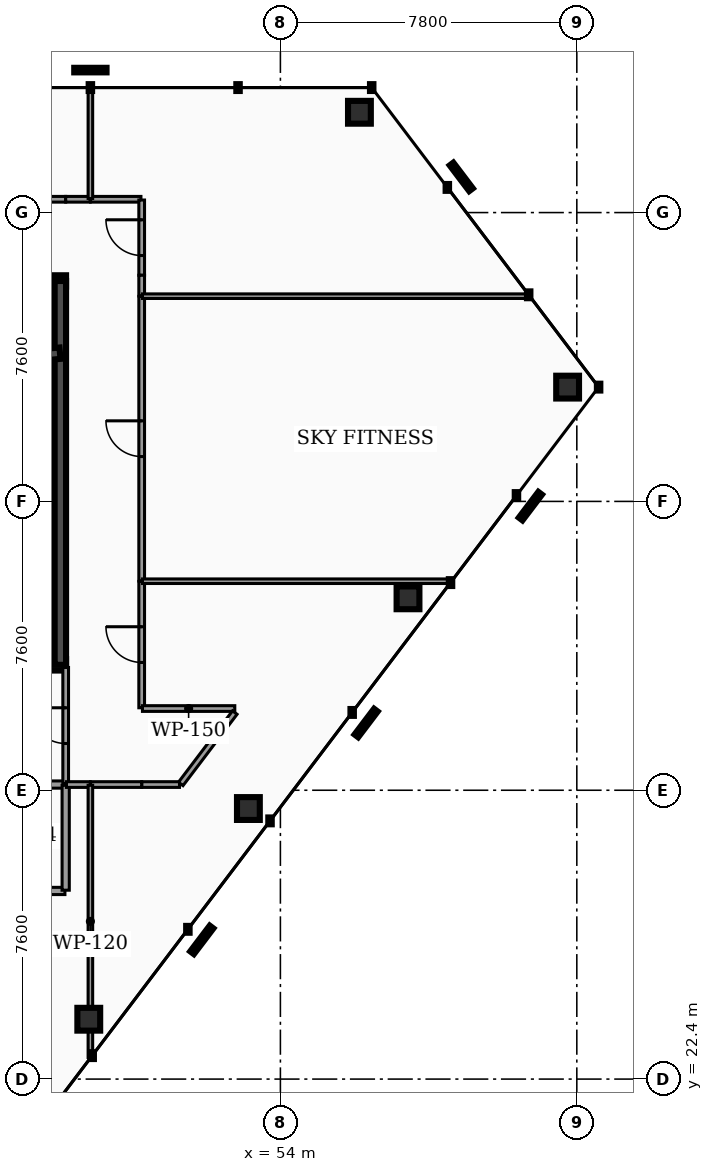
"""IFC4 building model, lengths in metres.
Left out: names, types, materials, properties, quantities, classifications, styles, units other than length and angle.
Written with IfcOpenShell. Run it as: python <this file> out.ifc"""

import sys

from ifc_helpers import new_model, si_unit, direction, frame, frame_2d, origin, origin_2d, place, context, subcontext, project, spatial, rectangle, hollow_rectangle, extrude, element, fill, save


model = new_model("IFC4")
c1 = context("Model", 3, precision=1e-05, world=origin(), true_north=direction((0.0, 1.0)))
c2 = subcontext(c1, "Body", "Model", "MODEL_VIEW")
j1 = project(units=[si_unit("LENGTHUNIT", "METRE"), si_unit("PLANEANGLEUNIT", "RADIAN")], contexts=[c1])
p1 = place(None, origin())
s1 = spatial("IfcSite", under=j1, at=p1, CompositionType="ELEMENT")
p2 = place(p1, origin())
s2 = spatial("IfcBuilding", under=s1, at=p2, CompositionType="ELEMENT")
p3 = place(p2, frame((0.0, 0.0, 199.92)))
s3 = spatial("IfcBuildingStorey", under=s2, at=p3, CompositionType="ELEMENT", Elevation=199.92)
p4 = place(p3, frame((28.5, 43.4, 0.0), z_axis=(0.0, 0.0, 1.0), x_axis=(1.0, 0.0, 0.0)))
e1 = element("IfcWall", 1, at=p4, inside=s3, PredefinedType="SHEAR", context=c2, shape_type="SweptSolid", body=[
    extrude(rectangle(XDim=19.86, YDim=0.3, at=frame_2d((9.93, 0.0))), origin(), (0.0, 0.0, 1.0), 4.12),
])
p5 = place(p3, frame((28.5, 33.3, 0.0), z_axis=(0.0, 0.0, 1.0), x_axis=(1.0, 0.0, 0.0)))
e2 = element("IfcWall", 2, at=p5, inside=s3, PredefinedType="SHEAR", context=c2, shape_type="SweptSolid", body=[
    extrude(rectangle(XDim=19.86, YDim=0.3, at=frame_2d((9.93, 0.0))), origin(), (0.0, 0.0, 1.0), 4.12),
])
p6 = place(p5, frame((3.93, 0.0, 0.0)))
e3 = element("IfcOpeningElement", 3, at=p6, cuts=e2, PredefinedType="OPENING", context=c2, shape_type="SweptSolid", body=[
    extrude(rectangle(XDim=1.1, YDim=2.15, at=frame_2d((0.55, 1.075))), frame((0.0, 0.16, 0.0), z_axis=(0.0, -1.0, 0.0), x_axis=(1.0, 0.0, 0.0)), (0.0, 0.0, 1.0), 0.32),
])
p7 = place(p5, frame((14.77, 0.0, 0.0)))
e4 = element("IfcOpeningElement", 4, at=p7, cuts=e2, PredefinedType="OPENING", context=c2, shape_type="SweptSolid", body=[
    extrude(rectangle(XDim=1.1, YDim=2.15, at=frame_2d((0.55, 1.075))), frame((0.0, 0.16, 0.0), z_axis=(0.0, -1.0, 0.0), x_axis=(1.0, 0.0, 0.0)), (0.0, 0.0, 1.0), 0.32),
])
p8 = place(p5, frame((11.25, 0.0, 0.0)))
e5 = element("IfcOpeningElement", 5, at=p8, cuts=e2, PredefinedType="OPENING", context=c2, shape_type="SweptSolid", body=[
    extrude(rectangle(XDim=1.0, YDim=2.1, at=frame_2d((0.5, 1.05))), frame((0.0, 0.16, 0.0), z_axis=(0.0, -1.0, 0.0), x_axis=(1.0, 0.0, 0.0)), (0.0, 0.0, 1.0), 0.32),
])
p9 = place(p5, frame((12.95, 0.0, 0.0)))
e6 = element("IfcOpeningElement", 6, at=p9, cuts=e2, PredefinedType="OPENING", context=c2, shape_type="SweptSolid", body=[
    extrude(rectangle(XDim=1.0, YDim=2.1, at=frame_2d((0.5, 1.05))), frame((0.0, 0.16, 0.0), z_axis=(0.0, -1.0, 0.0), x_axis=(1.0, 0.0, 0.0)), (0.0, 0.0, 1.0), 0.32),
])
p10 = place(p5, frame((5.85, 0.0, 0.0)))
e7 = element("IfcOpeningElement", 7, at=p10, cuts=e2, PredefinedType="OPENING", context=c2, shape_type="SweptSolid", body=[
    extrude(rectangle(XDim=1.0, YDim=2.1, at=frame_2d((0.5, 1.05))), frame((0.0, 0.16, 0.0), z_axis=(0.0, -1.0, 0.0), x_axis=(1.0, 0.0, 0.0)), (0.0, 0.0, 1.0), 0.32),
])
p11 = place(p5, frame((1.21, 0.0, 0.0)))
e8 = element("IfcOpeningElement", 8, at=p11, cuts=e2, PredefinedType="OPENING", context=c2, shape_type="SweptSolid", body=[
    extrude(rectangle(XDim=1.1, YDim=2.2, at=frame_2d((0.55, 1.1))), frame((0.0, 0.16, 0.0), z_axis=(0.0, -1.0, 0.0), x_axis=(1.0, 0.0, 0.0)), (0.0, 0.0, 1.0), 0.32),
])
p12 = place(p5, frame((9.34, 0.0, 0.0)))
e9 = element("IfcOpeningElement", 9, at=p12, cuts=e2, PredefinedType="OPENING", context=c2, shape_type="SweptSolid", body=[
    extrude(rectangle(XDim=1.12, YDim=2.05, at=frame_2d((0.56, 1.025))), frame((0.0, 0.16, 0.0), z_axis=(0.0, -1.0, 0.0), x_axis=(1.0, 0.0, 0.0)), (0.0, 0.0, 1.0), 0.32),
])
p13 = place(p5, frame((17.55, 0.0, 0.0)))
e10 = element("IfcOpeningElement", 10, at=p13, cuts=e2, PredefinedType="OPENING", context=c2, shape_type="SweptSolid", body=[
    extrude(rectangle(XDim=1.1, YDim=2.2, at=frame_2d((0.55, 1.1))), frame((0.0, 0.16, 0.0), z_axis=(0.0, -1.0, 0.0), x_axis=(1.0, 0.0, 0.0)), (0.0, 0.0, 1.0), 0.32),
])
p14 = place(p3, frame((48.21, 33.3, 0.0), z_axis=(0.0, 0.0, 1.0), x_axis=(0.0, 1.0, 0.0)))
e11 = element("IfcWall", 11, at=p14, inside=s3, PredefinedType="SHEAR", context=c2, shape_type="SweptSolid", body=[
    extrude(rectangle(XDim=10.1, YDim=0.3, at=frame_2d((5.05, 0.0))), origin(), (0.0, 0.0, 1.0), 4.12),
])
p15 = place(p3, frame((44.98, 41.2, 0.0), z_axis=(0.0, 0.0, 1.0), x_axis=(0.995686468965, 0.09278176286, 0.0)))
e12 = element("IfcWall", 12, at=p15, inside=s3, PredefinedType="SHEAR", context=c2, shape_type="SweptSolid", body=[
    extrude(rectangle(XDim=3.234, YDim=0.3, at=frame_2d((1.617, 0.0))), origin(), (0.0, 0.0, 1.0), 4.12),
])
for number, where, z_axis, x_axis in (
    (13, (56.08, 47.839, 0.0), (0.0, 0.0, 1.0), (1.0, 0.0, 0.0)),
    (14, (48.958, 23.975, 0.0), (0.0, 0.0, 1.0), (1.0, 0.0, 0.0)),
    (15, (53.158, 29.519, 0.0), (0.0, 0.0, 1.0), (1.0, 0.0, 0.0)),
    (16, (57.358, 35.063, 0.0), (0.0, 0.0, 1.0), (1.0, 0.0, 0.0)),
    (17, (61.558, 40.607, 0.0), (0.0, 0.0, 1.0), (1.0, 0.0, 0.0)),
):
    element("IfcColumn", number, at=place(p3, frame(where, z_axis=z_axis, x_axis=x_axis)), inside=s3, PredefinedType="COLUMN", context=c2, shape_type="SweptSolid", body=[
        extrude(hollow_rectangle(XDim=0.6, YDim=0.6, WallThickness=0.03, at=origin_2d()), origin(), (0.0, 0.0, 1.0), 4.12),
    ])
p16 = place(p3, frame((45.405, 30.15, 0.0), z_axis=(0.0, 0.0, 1.0), x_axis=(1.0, 0.0, 0.0)))
e18 = element("IfcWall", 18, at=p16, inside=s3, PredefinedType="PARTITIONING", context=c2, shape_type="SweptSolid", body=[
    extrude(rectangle(XDim=2.925, YDim=0.19, at=frame_2d((1.462, 0.0))), origin(), (0.0, 0.0, 1.0), 3.077),
])
p17 = place(p16, frame((0.903, 0.0, 0.0)))
e19 = element("IfcOpeningElement", 19, at=p17, cuts=e18, PredefinedType="OPENING", context=c2, shape_type="SweptSolid", body=[
    extrude(rectangle(XDim=1.12, YDim=2.05, at=frame_2d((0.56, 1.025))), frame((0.0, 0.105, 0.0), z_axis=(0.0, -1.0, 0.0), x_axis=(1.0, 0.0, 0.0)), (0.0, 0.0, 1.0), 0.21),
])
p18 = place(p3, frame((48.35, 30.17, 0.0), z_axis=(0.0, 0.0, 1.0), x_axis=(0.0, 1.0, 0.0)))
e20 = element("IfcWall", 20, at=p18, inside=s3, PredefinedType="PARTITIONING", context=c2, shape_type="SweptSolid", body=[
    extrude(rectangle(XDim=3.06, YDim=0.15, at=frame_2d((1.53, 0.0))), origin(), (0.0, 0.0, 1.0), 3.077),
])
p19 = place(p18, frame((1.06, 0.0, 0.0)))
e21 = element("IfcOpeningElement", 21, at=p19, cuts=e20, PredefinedType="OPENING", context=c2, shape_type="SweptSolid", body=[
    extrude(rectangle(XDim=0.94, YDim=2.05, at=frame_2d((0.47, 1.025))), frame((0.0, 0.085, 0.0), z_axis=(0.0, -1.0, 0.0), x_axis=(1.0, 0.0, 0.0)), (0.0, 0.0, 1.0), 0.17),
])
p20 = place(p3, frame((45.42, 27.35, 0.0), z_axis=(0.0, 0.0, 1.0), x_axis=(1.0, 0.0, 0.0)))
e22 = element("IfcWall", 22, at=p20, inside=s3, PredefinedType="PARTITIONING", context=c2, shape_type="SweptSolid", body=[
    extrude(rectangle(XDim=2.91, YDim=0.19, at=frame_2d((1.455, 0.0))), origin(), (0.0, 0.0, 1.0), 3.077),
])
p21 = place(p3, frame((48.35, 27.37, 0.0), z_axis=(0.0, 0.0, 1.0), x_axis=(0.0, 1.0, 0.0)))
e23 = element("IfcWall", 23, at=p21, inside=s3, PredefinedType="PARTITIONING", context=c2, shape_type="SweptSolid", body=[
    extrude(rectangle(XDim=2.76, YDim=0.19, at=frame_2d((1.38, 0.0))), origin(), (0.0, 0.0, 1.0), 3.077),
])
p22 = place(p3, frame((48.37, 30.15, 0.0), z_axis=(0.0, 0.0, 1.0), x_axis=(1.0, 0.0, 0.0)))
e24 = element("IfcWall", 24, at=p22, inside=s3, PredefinedType="PARTITIONING", context=c2, shape_type="SweptSolid", body=[
    extrude(rectangle(XDim=0.625, YDim=0.15, at=frame_2d((0.312, 0.0))), origin(), (0.0, 0.0, 1.0), 3.077),
])
p23 = place(p3, frame((50.35, 32.17, 0.0), z_axis=(0.0, 0.0, 1.0), x_axis=(0.0, 1.0, 0.0)))
e25 = element("IfcWall", 25, at=p23, inside=s3, PredefinedType="PARTITIONING", context=c2, shape_type="SweptSolid", body=[
    extrude(rectangle(XDim=3.325, YDim=0.15, at=frame_2d((1.663, 0.0))), origin(), (0.0, 0.0, 1.0), 3.077),
])
p24 = place(p23, frame((1.192, 0.0, 0.0)))
e26 = element("IfcOpeningElement", 26, at=p24, cuts=e25, PredefinedType="OPENING", context=c2, shape_type="SweptSolid", body=[
    extrude(rectangle(XDim=0.94, YDim=2.05, at=frame_2d((0.47, 1.025))), frame((0.0, 0.085, 0.0), z_axis=(0.0, -1.0, 0.0), x_axis=(1.0, 0.0, 0.0)), (0.0, 0.0, 1.0), 0.17),
])
p25 = place(p3, frame((50.37, 32.15, 0.0), z_axis=(0.0, 0.0, 1.0), x_axis=(1.0, 0.0, 0.0)))
e27 = element("IfcWall", 27, at=p25, inside=s3, PredefinedType="PARTITIONING", context=c2, shape_type="SweptSolid", body=[
    extrude(rectangle(XDim=2.43, YDim=0.15, at=frame_2d((1.215, 0.0))), origin(), (0.0, 0.0, 1.0), 3.077),
])
p26 = place(p3, frame((51.377, 30.166, 0.0), z_axis=(0.0, 0.0, 1.0), x_axis=(0.603855693114, 0.797093659424, 0.0)))
e28 = element("IfcWall", 28, at=p26, inside=s3, PredefinedType="PARTITIONING", context=c2, shape_type="SweptSolid", body=[
    extrude(rectangle(XDim=2.356, YDim=0.15, at=frame_2d((1.178, 0.0))), origin(), (0.0, 0.0, 1.0), 3.077),
])
p27 = place(p3, frame((50.35, 30.15, 0.0), z_axis=(0.0, 0.0, 1.0), x_axis=(1.0, 0.0, 0.0)))
e29 = element("IfcWall", 29, at=p27, inside=s3, PredefinedType="PARTITIONING", context=c2, shape_type="SweptSolid", body=[
    extrude(rectangle(XDim=0.995, YDim=0.15, at=frame_2d((0.498, 0.0))), origin(), (0.0, 0.0, 1.0), 3.077),
])
p28 = place(p3, frame((49.005, 30.15, 0.0), z_axis=(0.0, 0.0, 1.0), x_axis=(1.0, 0.0, 0.0)))
e30 = element("IfcWall", 30, at=p28, inside=s3, PredefinedType="PARTITIONING", context=c2, shape_type="SweptSolid", body=[
    extrude(rectangle(XDim=1.345, YDim=0.15, at=frame_2d((0.673, 0.0))), origin(), (0.0, 0.0, 1.0), 3.077),
])
p29 = place(p3, frame((50.35, 35.505, 0.0), z_axis=(0.0, 0.0, 1.0), x_axis=(0.0, 1.0, 0.0)))
e31 = element("IfcWall", 31, at=p29, inside=s3, PredefinedType="PARTITIONING", context=c2, shape_type="SweptSolid", body=[
    extrude(rectangle(XDim=7.49, YDim=0.15, at=frame_2d((3.745, 0.0))), origin(), (0.0, 0.0, 1.0), 3.077),
])
p30 = place(p29, frame((3.275, 0.0, 0.0)))
e32 = element("IfcOpeningElement", 32, at=p30, cuts=e31, PredefinedType="OPENING", context=c2, shape_type="SweptSolid", body=[
    extrude(rectangle(XDim=0.94, YDim=2.05, at=frame_2d((0.47, 1.025))), frame((0.0, 0.085, 0.0), z_axis=(0.0, -1.0, 0.0), x_axis=(1.0, 0.0, 0.0)), (0.0, 0.0, 1.0), 0.17),
])
p31 = place(p3, frame((49.005, 45.55, 0.0), z_axis=(0.0, 0.0, 1.0), x_axis=(1.0, 0.0, 0.0)))
e33 = element("IfcWall", 33, at=p31, inside=s3, PredefinedType="PARTITIONING", context=c2, shape_type="SweptSolid", body=[
    extrude(rectangle(XDim=1.325, YDim=0.15, at=frame_2d((0.663, 0.0))), origin(), (0.0, 0.0, 1.0), 3.077),
])
p32 = place(p3, frame((50.35, 43.55, 0.0), z_axis=(0.0, 0.0, 1.0), x_axis=(0.0, 1.0, 0.0)))
e34 = element("IfcWall", 34, at=p32, inside=s3, PredefinedType="PARTITIONING", context=c2, shape_type="SweptSolid", body=[
    extrude(rectangle(XDim=1.98, YDim=0.15, at=frame_2d((0.99, 0.0))), origin(), (0.0, 0.0, 1.0), 3.077),
])
p33 = place(p32, frame((0.52, 0.0, 0.0)))
e35 = element("IfcOpeningElement", 35, at=p33, cuts=e34, PredefinedType="OPENING", context=c2, shape_type="SweptSolid", body=[
    extrude(rectangle(XDim=0.94, YDim=2.05, at=frame_2d((0.47, 1.025))), frame((0.0, 0.085, 0.0), z_axis=(0.0, -1.0, 0.0), x_axis=(1.0, 0.0, 0.0)), (0.0, 0.0, 1.0), 0.17),
])
p34 = place(p3, frame((50.35, 43.005, 0.0), z_axis=(0.0, 0.0, 1.0), x_axis=(0.0, 1.0, 0.0)))
e36 = element("IfcWall", 36, at=p34, inside=s3, PredefinedType="PARTITIONING", context=c2, shape_type="SweptSolid", body=[
    extrude(rectangle(XDim=0.545, YDim=0.15, at=frame_2d((0.272, 0.0))), origin(), (0.0, 0.0, 1.0), 3.077),
])
p35 = place(p3, frame((28.55, 45.55, 0.0), z_axis=(0.0, 0.0, 1.0), x_axis=(1.0, 0.0, 0.0)))
e37 = element("IfcWall", 37, at=p35, inside=s3, PredefinedType="PARTITIONING", context=c2, shape_type="SweptSolid", body=[
    extrude(rectangle(XDim=19.8, YDim=0.15, at=frame_2d((9.9, 0.0))), origin(), (0.0, 0.0, 1.0), 3.077),
])
p36 = place(p35, frame((9.34, 0.0, 0.0)))
e38 = element("IfcOpeningElement", 38, at=p36, cuts=e37, PredefinedType="OPENING", context=c2, shape_type="SweptSolid", body=[
    extrude(rectangle(XDim=1.12, YDim=2.05, at=frame_2d((0.56, 1.025))), frame((0.0, 0.085, 0.0), z_axis=(0.0, -1.0, 0.0), x_axis=(1.0, 0.0, 0.0)), (0.0, 0.0, 1.0), 0.17),
])
p37 = place(p3, frame((48.35, 45.55, 0.0), z_axis=(0.0, 0.0, 1.0), x_axis=(1.0, 0.0, 0.0)))
e39 = element("IfcWall", 39, at=p37, inside=s3, PredefinedType="PARTITIONING", context=c2, shape_type="SweptSolid", body=[
    extrude(rectangle(XDim=0.645, YDim=0.15, at=frame_2d((0.323, 0.0))), origin(), (0.0, 0.0, 1.0), 3.077),
])
p38 = place(p3, frame((49.0, 22.969, 0.0), z_axis=(0.0, 0.0, 1.0), x_axis=(0.0, 1.0, 0.0)))
e40 = element("IfcWall", 40, at=p38, inside=s3, PredefinedType="PARTITIONING", context=c2, shape_type="SweptSolid", body=[
    extrude(rectangle(XDim=7.161, YDim=0.12, at=frame_2d((3.58, 0.0))), origin(), (0.0, 0.0, 1.0), 3.077),
])
p39 = place(p3, frame((50.37, 35.5, 0.0), z_axis=(0.0, 0.0, 1.0), x_axis=(1.0, 0.0, 0.0)))
e41 = element("IfcWall", 41, at=p39, inside=s3, PredefinedType="PARTITIONING", context=c2, shape_type="SweptSolid", body=[
    extrude(rectangle(XDim=8.119, YDim=0.12, at=frame_2d((4.06, 0.0))), origin(), (0.0, 0.0, 1.0), 3.077),
])
p40 = place(p3, frame((50.37, 43.0, 0.0), z_axis=(0.0, 0.0, 1.0), x_axis=(1.0, 0.0, 0.0)))
e42 = element("IfcWall", 42, at=p40, inside=s3, PredefinedType="PARTITIONING", context=c2, shape_type="SweptSolid", body=[
    extrude(rectangle(XDim=10.176, YDim=0.12, at=frame_2d((5.088, 0.0))), origin(), (0.0, 0.0, 1.0), 3.077),
])
p41 = place(p3, frame((49.0, 45.57, 0.0), z_axis=(0.0, 0.0, 1.0), x_axis=(0.0, 1.0, 0.0)))
e43 = element("IfcWall", 43, at=p41, inside=s3, PredefinedType="PARTITIONING", context=c2, shape_type="SweptSolid", body=[
    extrude(rectangle(XDim=2.904, YDim=0.12, at=frame_2d((1.452, 0.0))), origin(), (0.0, 0.0, 1.0), 3.077),
])
p42 = place(p19, origin())
e44 = element("IfcDoor", 44, at=p42, inside=s3, OperationType="SINGLE_SWING_RIGHT", PredefinedType="DOOR", context=c2, shape_type="SweptSolid", body=[
    extrude(rectangle(XDim=0.94, YDim=2.05, at=frame_2d((0.47, 1.025))), frame((0.0, 0.025, 0.0), z_axis=(0.0, -1.0, 0.0), x_axis=(1.0, 0.0, 0.0)), (0.0, 0.0, 1.0), 0.05),
])
fill(e21, e44)
p43 = place(p24, origin())
e45 = element("IfcDoor", 45, at=p43, inside=s3, OperationType="SINGLE_SWING_RIGHT", PredefinedType="DOOR", context=c2, shape_type="SweptSolid", body=[
    extrude(rectangle(XDim=0.94, YDim=2.05, at=frame_2d((0.47, 1.025))), frame((0.0, 0.025, 0.0), z_axis=(0.0, -1.0, 0.0), x_axis=(1.0, 0.0, 0.0)), (0.0, 0.0, 1.0), 0.05),
])
fill(e26, e45)
p44 = place(p30, origin())
e46 = element("IfcDoor", 46, at=p44, inside=s3, OperationType="SINGLE_SWING_RIGHT", PredefinedType="DOOR", context=c2, shape_type="SweptSolid", body=[
    extrude(rectangle(XDim=0.94, YDim=2.05, at=frame_2d((0.47, 1.025))), frame((0.0, 0.025, 0.0), z_axis=(0.0, -1.0, 0.0), x_axis=(1.0, 0.0, 0.0)), (0.0, 0.0, 1.0), 0.05),
])
fill(e32, e46)
p45 = place(p33, origin())
e47 = element("IfcDoor", 47, at=p45, inside=s3, OperationType="SINGLE_SWING_RIGHT", PredefinedType="DOOR", context=c2, shape_type="SweptSolid", body=[
    extrude(rectangle(XDim=0.94, YDim=2.05, at=frame_2d((0.47, 1.025))), frame((0.0, 0.025, 0.0), z_axis=(0.0, -1.0, 0.0), x_axis=(1.0, 0.0, 0.0)), (0.0, 0.0, 1.0), 0.05),
])
fill(e35, e47)
save(model, sys.argv[1])
